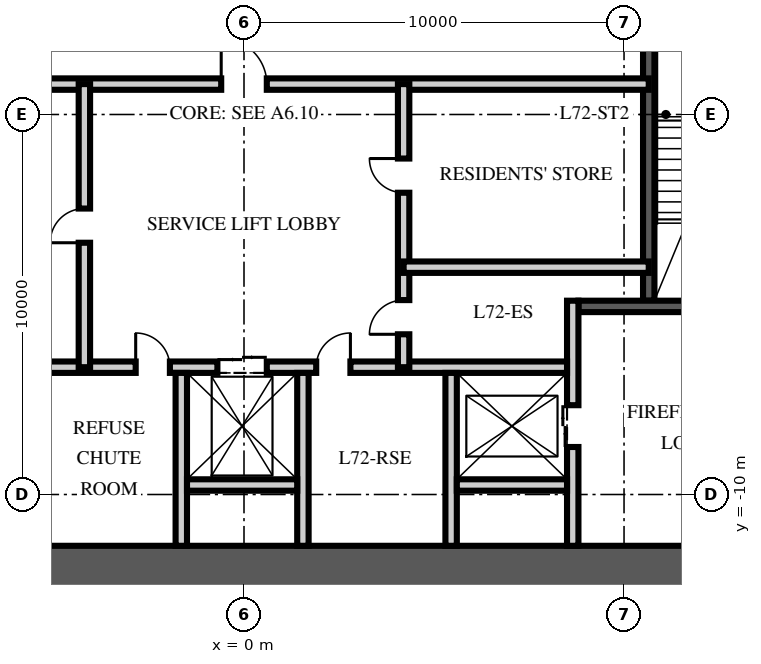
"""IFC4 building model, lengths in metres.
Left out: names, types, materials, properties, quantities, classifications, styles, units other than length and angle.
Written with IfcOpenShell. Run it as: python <this file> out.ifc"""

import sys

from ifc_helpers import new_model, si_unit, direction, frame, frame_2d, origin, place, context, subcontext, project, spatial, rectangle, extrude, element, fill, save


model = new_model("IFC4")
c1 = context("Model", 3, precision=1e-05, world=origin(), true_north=direction((0.0, 1.0)))
c2 = subcontext(c1, "Body", "Model", "MODEL_VIEW")
j1 = project(units=[si_unit("LENGTHUNIT", "METRE"), si_unit("PLANEANGLEUNIT", "RADIAN")], contexts=[c1])
p1 = place(None, origin())
s1 = spatial("IfcSite", under=j1, at=p1, CompositionType="ELEMENT")
p2 = place(p1, origin())
s2 = spatial("IfcBuilding", under=s1, at=p2, CompositionType="ELEMENT")
p3 = place(p2, frame((0.0, 0.0, 289.5)))
s3 = spatial("IfcBuildingStorey", under=s2, at=p3, CompositionType="ELEMENT", Elevation=289.5)
p4 = place(p3, frame((-15.5, -12.0, -0.25), z_axis=(0.0, 0.0, 1.0), x_axis=(1.0, 0.0, 0.0)))
e1 = element("IfcWall", 1, at=p4, inside=s3, PredefinedType="SHEAR", context=c2, shape_type="SweptSolid", body=[
    extrude(rectangle(XDim=31.0, YDim=1.3, at=frame_2d((15.5, 0.0))), origin(), (0.0, 0.0, 1.0), 3.75),
])
p5 = place(p3, frame((10.65, -4.9, 0.0), z_axis=(0.0, 0.0, 1.0), x_axis=(0.0, 1.0, 0.0)))
e2 = element("IfcWall", 2, at=p5, inside=s3, PredefinedType="SOLIDWALL", context=c2, shape_type="SweptSolid", body=[
    extrude(rectangle(XDim=10.1, YDim=0.3, at=frame_2d((5.05, 0.0))), origin(), (0.0, 0.0, 1.0), 3.5),
])
p6 = place(p3, frame((14.85, -5.05, 0.0), z_axis=(0.0, 0.0, 1.0), x_axis=(-1.0, 0.0, 0.0)))
e3 = element("IfcWall", 3, at=p6, inside=s3, PredefinedType="SOLIDWALL", context=c2, shape_type="SweptSolid", body=[
    extrude(rectangle(XDim=6.05, YDim=0.3, at=frame_2d((3.025, 0.0))), origin(), (0.0, 0.0, 1.0), 3.5),
])
p7 = place(p6, frame((1.425, 0.0, 0.0)))
e4 = element("IfcOpeningElement", 4, at=p7, cuts=e3, PredefinedType="OPENING", context=c2, shape_type="SweptSolid", body=[
    extrude(rectangle(XDim=1.2, YDim=2.1, at=frame_2d((0.6, 1.05))), frame((0.0, 0.16, 0.0), z_axis=(0.0, -1.0, 0.0), x_axis=(1.0, 0.0, 0.0)), (0.0, 0.0, 1.0), 0.32),
])
p8 = place(p3, frame((8.65, -11.35, 0.0), z_axis=(0.0, 0.0, 1.0), x_axis=(0.0, 1.0, 0.0)))
e5 = element("IfcWall", 5, at=p8, inside=s3, PredefinedType="PARTITIONING", context=c2, shape_type="SweptSolid", body=[
    extrude(rectangle(XDim=6.45, YDim=0.3, at=frame_2d((3.225, 0.0))), origin(), (0.0, 0.0, 1.0), 3.5),
])
p9 = place(p8, frame((2.6, 0.0, 0.0)))
e6 = element("IfcOpeningElement", 6, at=p9, cuts=e5, PredefinedType="OPENING", context=c2, shape_type="SweptSolid", body=[
    extrude(rectangle(XDim=1.1, YDim=2.1, at=frame_2d((0.55, 1.05))), frame((0.0, 0.16, 0.0), z_axis=(0.0, -1.0, 0.0), x_axis=(1.0, 0.0, 0.0)), (0.0, 0.0, 1.0), 0.32),
])
p10 = place(p3, frame((-8.5, -6.65, 0.0), z_axis=(0.0, 0.0, 1.0), x_axis=(1.0, 0.0, 0.0)))
e7 = element("IfcWall", 7, at=p10, inside=s3, PredefinedType="PARTITIONING", context=c2, shape_type="SweptSolid", body=[
    extrude(rectangle(XDim=17.0, YDim=0.3, at=frame_2d((8.5, 0.0))), origin(), (0.0, 0.0, 1.0), 3.5),
])
p11 = place(p10, frame((7.8, 0.0, 0.0)))
e8 = element("IfcOpeningElement", 8, at=p11, cuts=e7, PredefinedType="OPENING", context=c2, shape_type="SweptSolid", body=[
    extrude(rectangle(XDim=1.3, YDim=2.4, at=frame_2d((0.65, 1.2))), frame((0.0, 0.16, 0.0), z_axis=(0.0, -1.0, 0.0), x_axis=(1.0, 0.0, 0.0)), (0.0, 0.0, 1.0), 0.32),
])
p12 = place(p10, frame((5.65, 0.0, 0.0)))
e9 = element("IfcOpeningElement", 9, at=p12, cuts=e7, PredefinedType="OPENING", context=c2, shape_type="SweptSolid", body=[
    extrude(rectangle(XDim=0.9, YDim=2.1, at=frame_2d((0.45, 1.05))), frame((0.0, 0.16, 0.0), z_axis=(0.0, -1.0, 0.0), x_axis=(1.0, 0.0, 0.0)), (0.0, 0.0, 1.0), 0.32),
])
p13 = place(p10, frame((10.4, 0.0, 0.0)))
e10 = element("IfcOpeningElement", 10, at=p13, cuts=e7, PredefinedType="OPENING", context=c2, shape_type="SweptSolid", body=[
    extrude(rectangle(XDim=0.9, YDim=2.1, at=frame_2d((0.45, 1.05))), frame((0.0, 0.16, 0.0), z_axis=(0.0, -1.0, 0.0), x_axis=(1.0, 0.0, 0.0)), (0.0, 0.0, 1.0), 0.32),
])
for number, where, z_axis, x_axis in (
    (11, (-1.65, -11.35, 0.0), (0.0, 0.0, 1.0), (0.0, 1.0, 0.0)),
    (12, (1.55, -11.35, 0.0), (0.0, 0.0, 1.0), (0.0, 1.0, 0.0)),
    (13, (5.45, -11.35, 0.0), (0.0, 0.0, 1.0), (0.0, 1.0, 0.0)),
):
    element("IfcWall", number, at=place(p3, frame(where, z_axis=z_axis, x_axis=x_axis)), inside=s3, PredefinedType="PARTITIONING", context=c2, shape_type="SweptSolid", body=[
        extrude(rectangle(XDim=4.55, YDim=0.3, at=frame_2d((2.275, 0.0))), origin(), (0.0, 0.0, 1.0), 3.5),
    ])
for number, where, z_axis, x_axis in (
    (14, (-1.5, -9.75, 0.0), (0.0, 0.0, 1.0), (1.0, 0.0, 0.0)),
    (15, (5.6, -9.75, 0.0), (0.0, 0.0, 1.0), (1.0, 0.0, 0.0)),
):
    element("IfcWall", number, at=place(p3, frame(where, z_axis=z_axis, x_axis=x_axis)), inside=s3, PredefinedType="PARTITIONING", context=c2, shape_type="SweptSolid", body=[
        extrude(rectangle(XDim=2.9, YDim=0.3, at=frame_2d((1.45, 0.0))), origin(), (0.0, 0.0, 1.0), 3.5),
    ])
p14 = place(p3, frame((-10.65, 0.8, 0.0), z_axis=(0.0, 0.0, 1.0), x_axis=(1.0, 0.0, 0.0)))
e16 = element("IfcWall", 16, at=p14, inside=s3, PredefinedType="PARTITIONING", context=c2, shape_type="SweptSolid", body=[
    extrude(rectangle(XDim=21.3, YDim=0.3, at=frame_2d((10.65, 0.0))), origin(), (0.0, 0.0, 1.0), 3.5),
])
p15 = place(p14, frame((10.05, 0.0, 0.0)))
e17 = element("IfcOpeningElement", 17, at=p15, cuts=e16, PredefinedType="OPENING", context=c2, shape_type="SweptSolid", body=[
    extrude(rectangle(XDim=1.2, YDim=2.1, at=frame_2d((0.6, 1.05))), frame((0.0, 0.16, 0.0), z_axis=(0.0, -1.0, 0.0), x_axis=(1.0, 0.0, 0.0)), (0.0, 0.0, 1.0), 0.32),
])
p16 = place(p14, frame((0.793, 0.0, 0.0)))
e18 = element("IfcOpeningElement", 18, at=p16, cuts=e16, PredefinedType="OPENING", context=c2, shape_type="SweptSolid", body=[
    extrude(rectangle(XDim=0.9, YDim=2.1, at=frame_2d((0.45, 1.05))), frame((0.0, 0.16, 0.0), z_axis=(0.0, -1.0, 0.0), x_axis=(1.0, 0.0, 0.0)), (0.0, 0.0, 1.0), 0.32),
])
p17 = place(p3, frame((-4.2, -6.65, 0.0), z_axis=(0.0, 0.0, 1.0), x_axis=(0.0, 1.0, 0.0)))
e19 = element("IfcWall", 19, at=p17, inside=s3, PredefinedType="PARTITIONING", context=c2, shape_type="SweptSolid", body=[
    extrude(rectangle(XDim=7.45, YDim=0.3, at=frame_2d((3.725, 0.0))), origin(), (0.0, 0.0, 1.0), 3.5),
])
p18 = place(p17, frame((3.275, 0.0, 0.0)))
e20 = element("IfcOpeningElement", 20, at=p18, cuts=e19, PredefinedType="OPENING", context=c2, shape_type="SweptSolid", body=[
    extrude(rectangle(XDim=0.9, YDim=2.1, at=frame_2d((0.45, 1.05))), frame((0.0, 0.16, 0.0), z_axis=(0.0, -1.0, 0.0), x_axis=(1.0, 0.0, 0.0)), (0.0, 0.0, 1.0), 0.32),
])
p19 = place(p3, frame((4.2, -6.65, 0.0), z_axis=(0.0, 0.0, 1.0), x_axis=(0.0, 1.0, 0.0)))
e21 = element("IfcWall", 21, at=p19, inside=s3, PredefinedType="PARTITIONING", context=c2, shape_type="SweptSolid", body=[
    extrude(rectangle(XDim=7.45, YDim=0.3, at=frame_2d((3.725, 0.0))), origin(), (0.0, 0.0, 1.0), 3.5),
])
p20 = place(p19, frame((0.866, 0.0, 0.0)))
e22 = element("IfcOpeningElement", 22, at=p20, cuts=e21, PredefinedType="OPENING", context=c2, shape_type="SweptSolid", body=[
    extrude(rectangle(XDim=0.9, YDim=2.1, at=frame_2d((0.45, 1.05))), frame((0.0, 0.16, 0.0), z_axis=(0.0, -1.0, 0.0), x_axis=(1.0, 0.0, 0.0)), (0.0, 0.0, 1.0), 0.32),
])
p21 = place(p19, frame((4.591, 0.0, 0.0)))
e23 = element("IfcOpeningElement", 23, at=p21, cuts=e21, PredefinedType="OPENING", context=c2, shape_type="SweptSolid", body=[
    extrude(rectangle(XDim=0.9, YDim=2.1, at=frame_2d((0.45, 1.05))), frame((0.0, 0.16, 0.0), z_axis=(0.0, -1.0, 0.0), x_axis=(1.0, 0.0, 0.0)), (0.0, 0.0, 1.0), 0.32),
])
p22 = place(p3, frame((10.65, -4.018, 0.0), z_axis=(0.0, 0.0, 1.0), x_axis=(-1.0, 0.0, 0.0)))
e24 = element("IfcWall", 24, at=p22, inside=s3, PredefinedType="PARTITIONING", context=c2, shape_type="SweptSolid", body=[
    extrude(rectangle(XDim=6.45, YDim=0.3, at=frame_2d((3.225, 0.0))), origin(), (0.0, 0.0, 1.0), 3.5),
])
p23 = place(p9, origin())
e25 = element("IfcDoor", 25, at=p23, inside=s3, OperationType="DOUBLE_DOOR_SLIDING", PredefinedType="DOOR", context=c2, shape_type="SweptSolid", body=[
    extrude(rectangle(XDim=1.1, YDim=2.1, at=frame_2d((0.55, 1.05))), frame((0.0, 0.025, 0.0), z_axis=(0.0, -1.0, 0.0), x_axis=(1.0, 0.0, 0.0)), (0.0, 0.0, 1.0), 0.05),
])
fill(e6, e25)
p24 = place(p11, origin())
e26 = element("IfcDoor", 26, at=p24, inside=s3, OperationType="DOUBLE_DOOR_SLIDING", PredefinedType="DOOR", context=c2, shape_type="SweptSolid", body=[
    extrude(rectangle(XDim=1.3, YDim=2.4, at=frame_2d((0.65, 1.2))), frame((0.0, 0.025, 0.0), z_axis=(0.0, -1.0, 0.0), x_axis=(1.0, 0.0, 0.0)), (0.0, 0.0, 1.0), 0.05),
])
fill(e8, e26)
p25 = place(p15, origin())
e27 = element("IfcDoor", 27, at=p25, inside=s3, OperationType="SINGLE_SWING_LEFT", PredefinedType="DOOR", context=c2, shape_type="SweptSolid", body=[
    extrude(rectangle(XDim=1.2, YDim=2.1, at=frame_2d((0.6, 1.05))), frame((0.0, 0.025, 0.0), z_axis=(0.0, -1.0, 0.0), x_axis=(1.0, 0.0, 0.0)), (0.0, 0.0, 1.0), 0.05),
])
fill(e17, e27)
p26 = place(p12, origin())
e28 = element("IfcDoor", 28, at=p26, inside=s3, OperationType="SINGLE_SWING_LEFT", PredefinedType="DOOR", context=c2, shape_type="SweptSolid", body=[
    extrude(rectangle(XDim=0.9, YDim=2.1, at=frame_2d((0.45, 1.05))), frame((0.0, 0.025, 0.0), z_axis=(0.0, -1.0, 0.0), x_axis=(1.0, 0.0, 0.0)), (0.0, 0.0, 1.0), 0.05),
])
fill(e9, e28)
p27 = place(p13, origin())
e29 = element("IfcDoor", 29, at=p27, inside=s3, OperationType="SINGLE_SWING_RIGHT", PredefinedType="DOOR", context=c2, shape_type="SweptSolid", body=[
    extrude(rectangle(XDim=0.9, YDim=2.1, at=frame_2d((0.45, 1.05))), frame((0.0, 0.025, 0.0), z_axis=(0.0, -1.0, 0.0), x_axis=(1.0, 0.0, 0.0)), (0.0, 0.0, 1.0), 0.05),
])
fill(e10, e29)
p28 = place(p18, origin())
e30 = element("IfcDoor", 30, at=p28, inside=s3, OperationType="SINGLE_SWING_LEFT", PredefinedType="DOOR", context=c2, shape_type="SweptSolid", body=[
    extrude(rectangle(XDim=0.9, YDim=2.1, at=frame_2d((0.45, 1.05))), frame((0.0, 0.025, 0.0), z_axis=(0.0, -1.0, 0.0), x_axis=(1.0, 0.0, 0.0)), (0.0, 0.0, 1.0), 0.05),
])
fill(e20, e30)
p29 = place(p20, origin())
e31 = element("IfcDoor", 31, at=p29, inside=s3, OperationType="SINGLE_SWING_LEFT", PredefinedType="DOOR", context=c2, shape_type="SweptSolid", body=[
    extrude(rectangle(XDim=0.9, YDim=2.1, at=frame_2d((0.45, 1.05))), frame((0.0, 0.025, 0.0), z_axis=(0.0, -1.0, 0.0), x_axis=(1.0, 0.0, 0.0)), (0.0, 0.0, 1.0), 0.05),
])
fill(e22, e31)
p30 = place(p21, origin())
e32 = element("IfcDoor", 32, at=p30, inside=s3, OperationType="SINGLE_SWING_RIGHT", PredefinedType="DOOR", context=c2, shape_type="SweptSolid", body=[
    extrude(rectangle(XDim=0.9, YDim=2.1, at=frame_2d((0.45, 1.05))), frame((0.0, 0.025, 0.0), z_axis=(0.0, -1.0, 0.0), x_axis=(1.0, 0.0, 0.0)), (0.0, 0.0, 1.0), 0.05),
])
fill(e23, e32)
save(model, sys.argv[1])
